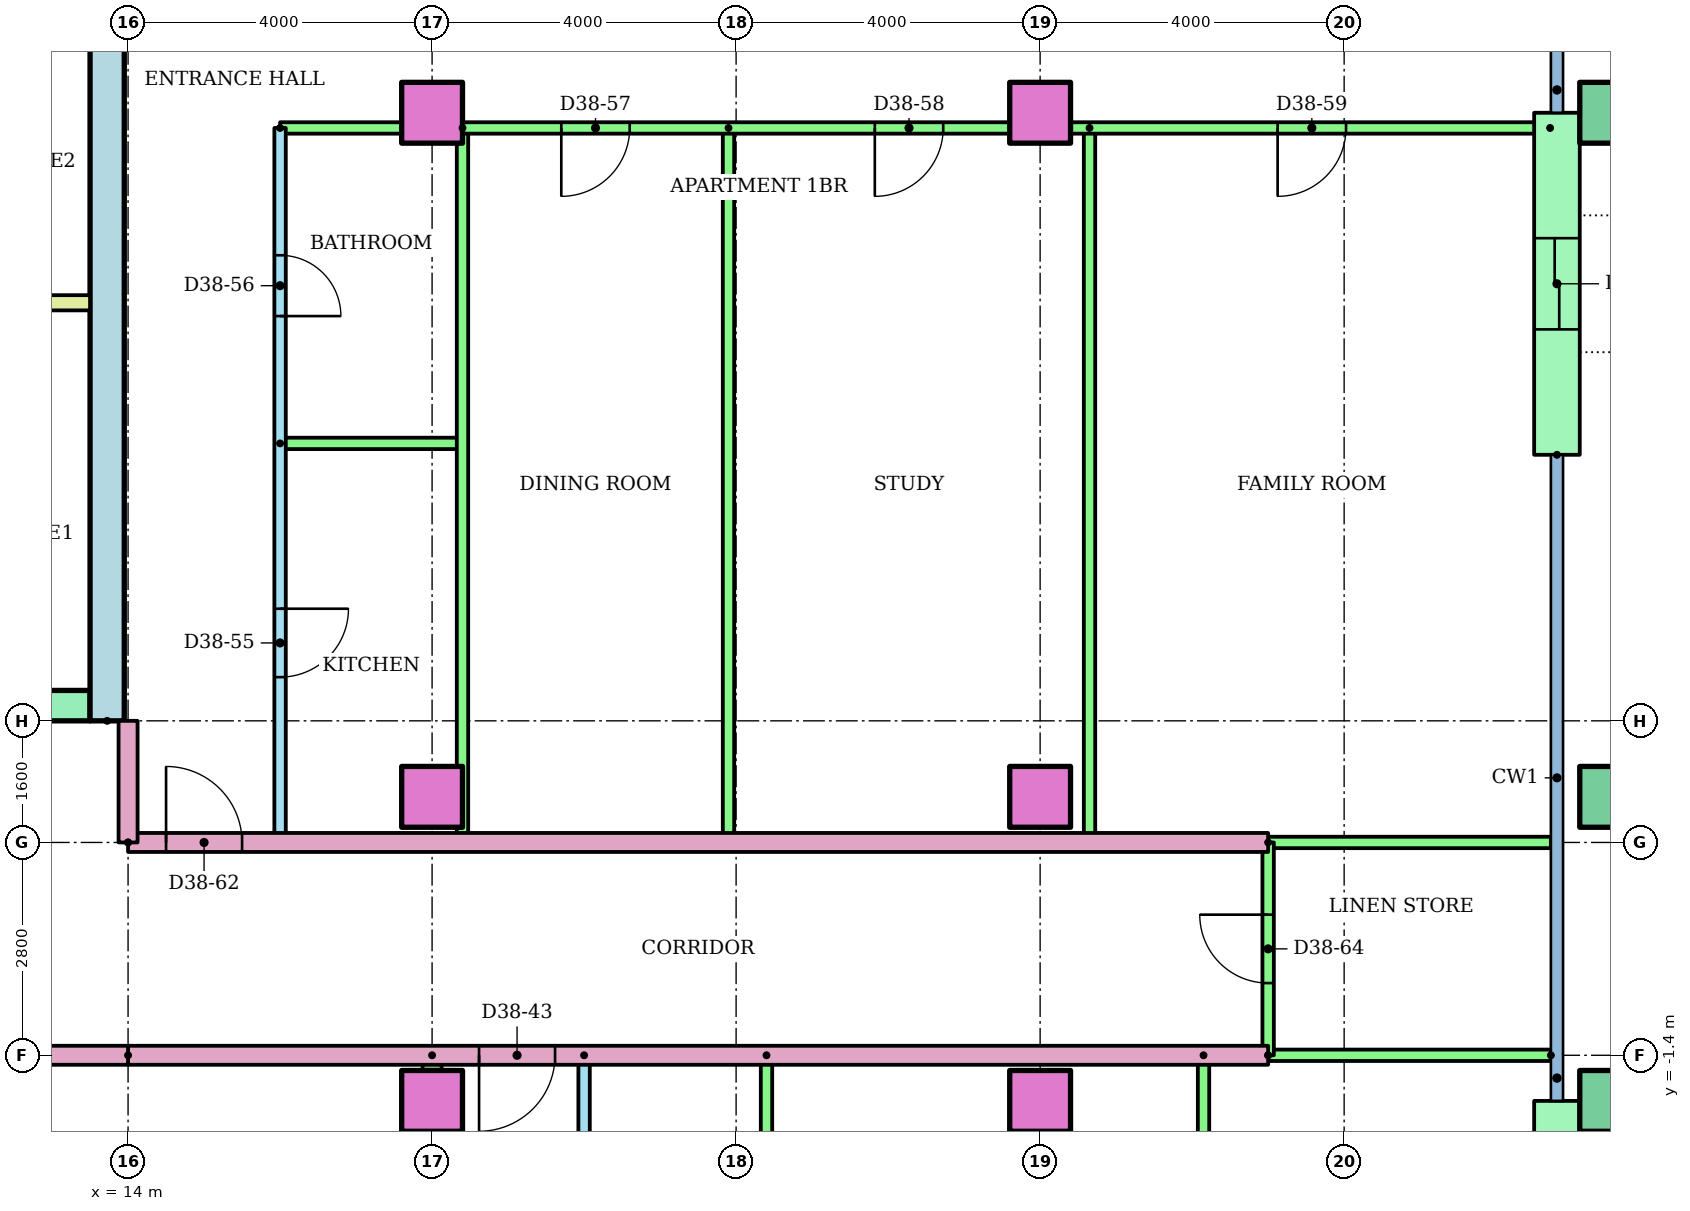
"""IFC4 building model, lengths in metres.
Left out: names, types, materials, properties, quantities, classifications, styles, units other than length and angle.
Written with IfcOpenShell. Run it as: python <this file> out.ifc"""

import sys

from ifc_helpers import new_model, si_unit, direction, frame, frame_2d, origin, origin_2d, place, context, subcontext, project, spatial, rectangle, hollow_rectangle, extrude, element, fill, save


model = new_model("IFC4")
c1 = context("Model", 3, precision=1e-05, world=origin(), true_north=direction((0.0, 1.0)))
c2 = subcontext(c1, "Body", "Model", "MODEL_VIEW")
j1 = project(units=[si_unit("LENGTHUNIT", "METRE"), si_unit("PLANEANGLEUNIT", "RADIAN")], contexts=[c1])
p1 = place(None, origin())
s1 = spatial("IfcSite", under=j1, at=p1, CompositionType="ELEMENT")
p2 = place(p1, origin())
s2 = spatial("IfcBuilding", under=s1, at=p2, CompositionType="ELEMENT")
p3 = place(p2, frame((0.0, 0.0, 145.4)))
s3 = spatial("IfcBuildingStorey", under=s2, at=p3, CompositionType="ELEMENT", Elevation=145.4)
for number, where in (
    (1, (18.0, -2.0, 0.0)),
    (2, (26.0, -2.0, 0.0)),
):
    element("IfcColumn", number, at=place(p3, frame(where)), inside=s3, PredefinedType="COLUMN", context=c2, shape_type="SweptSolid", body=[
        extrude(rectangle(XDim=0.8, YDim=0.8, at=origin_2d()), origin(), (0.0, 0.0, 1.0), 3.2),
    ])
p4 = place(p3, frame((33.5, -2.0, 0.0)))
e3 = element("IfcColumn", 3, at=p4, inside=s3, PredefinedType="COLUMN", context=c2, shape_type="SweptSolid", body=[
    extrude(hollow_rectangle(XDim=0.8, YDim=0.8, WallThickness=0.04, at=origin_2d()), origin(), (0.0, 0.0, 1.0), 3.2),
])
for number, where in (
    (4, (18.0, 2.0, 0.0)),
    (5, (26.0, 2.0, 0.0)),
):
    element("IfcColumn", number, at=place(p3, frame(where)), inside=s3, PredefinedType="COLUMN", context=c2, shape_type="SweptSolid", body=[
        extrude(rectangle(XDim=0.8, YDim=0.8, at=origin_2d()), origin(), (0.0, 0.0, 1.0), 3.2),
    ])
p5 = place(p3, frame((33.5, 2.0, 0.0)))
e6 = element("IfcColumn", 6, at=p5, inside=s3, PredefinedType="COLUMN", context=c2, shape_type="SweptSolid", body=[
    extrude(hollow_rectangle(XDim=0.8, YDim=0.8, WallThickness=0.04, at=origin_2d()), origin(), (0.0, 0.0, 1.0), 3.2),
])
for number, where in (
    (7, (18.0, 11.0, 0.0)),
    (8, (26.0, 11.0, 0.0)),
):
    element("IfcColumn", number, at=place(p3, frame(where)), inside=s3, PredefinedType="COLUMN", context=c2, shape_type="SweptSolid", body=[
        extrude(rectangle(XDim=0.8, YDim=0.8, at=origin_2d()), origin(), (0.0, 0.0, 1.0), 3.2),
    ])
p6 = place(p3, frame((33.5, 11.0, 0.0)))
e9 = element("IfcColumn", 9, at=p6, inside=s3, PredefinedType="COLUMN", context=c2, shape_type="SweptSolid", body=[
    extrude(hollow_rectangle(XDim=0.8, YDim=0.8, WallThickness=0.04, at=origin_2d()), origin(), (0.0, 0.0, 1.0), 3.2),
])
p7 = place(p3, frame((32.8, -5.7, 0.0), z_axis=(0.0, 0.0, 1.0), x_axis=(0.0, 1.0, 0.0)))
e10 = element("IfcWall", 10, at=p7, inside=s3, PredefinedType="STANDARD", context=c2, shape_type="SweptSolid", body=[
    extrude(rectangle(XDim=3.7, YDim=0.6, at=frame_2d((1.85, 0.0))), origin(), (0.0, 0.0, 1.0), 2.92),
])
p8 = place(p7, frame((1.25, 0.0, 0.0)))
e11 = element("IfcOpeningElement", 11, at=p8, cuts=e10, PredefinedType="OPENING", context=c2, shape_type="SweptSolid", body=[
    extrude(rectangle(XDim=1.2, YDim=2.1, at=frame_2d((0.6, 1.05))), frame((0.0, 0.31, 0.0), z_axis=(0.0, -1.0, 0.0), x_axis=(1.0, 0.0, 0.0)), (0.0, 0.0, 1.0), 0.62),
])
p9 = place(p3, frame((32.8, 6.5, 0.0), z_axis=(0.0, 0.0, 1.0), x_axis=(0.0, 1.0, 0.0)))
e12 = element("IfcWall", 12, at=p9, inside=s3, PredefinedType="STANDARD", context=c2, shape_type="SweptSolid", body=[
    extrude(rectangle(XDim=4.5, YDim=0.6, at=frame_2d((2.25, 0.0))), origin(), (0.0, 0.0, 1.0), 2.92),
])
p10 = place(p9, frame((1.65, 0.0, 0.0)))
e13 = element("IfcOpeningElement", 13, at=p10, cuts=e12, PredefinedType="OPENING", context=c2, shape_type="SweptSolid", body=[
    extrude(rectangle(XDim=1.2, YDim=2.1, at=frame_2d((0.6, 1.05))), frame((0.0, 0.31, 0.0), z_axis=(0.0, -1.0, 0.0), x_axis=(1.0, 0.0, 0.0)), (0.0, 0.0, 1.0), 0.62),
])
p11 = place(p3, frame((13.725, 3.0, 0.0), z_axis=(0.0, 0.0, 1.0), x_axis=(0.0, 1.0, 0.0)))
e14 = element("IfcWall", 14, at=p11, inside=s3, PredefinedType="SHEAR", context=c2, shape_type="SweptSolid", body=[
    extrude(rectangle(XDim=17.0, YDim=0.45, at=frame_2d((8.5, 0.0))), origin(), (0.0, 0.0, 1.0), 2.92),
])
p12 = place(p3, frame((-13.5, 3.2, 0.0)))
e15 = element("IfcWall", 15, at=p12, inside=s3, PredefinedType="SHEAR", context=c2, shape_type="SweptSolid", body=[
    extrude(rectangle(XDim=27.0, YDim=0.4, at=frame_2d((13.5, 0.0))), origin(), (0.0, 0.0, 1.0), 2.92),
])
p13 = place(p12, frame((6.861, 0.0, 0.0)))
e16 = element("IfcOpeningElement", 16, at=p13, cuts=e15, PredefinedType="OPENING", context=c2, shape_type="SweptSolid", body=[
    extrude(rectangle(XDim=1.1, YDim=2.1, at=frame_2d((0.55, 1.05))), frame((0.0, 0.21, 0.0), z_axis=(0.0, -1.0, 0.0), x_axis=(1.0, 0.0, 0.0)), (0.0, 0.0, 1.0), 0.42),
])
p14 = place(p12, frame((9.906, 0.0, 0.0)))
e17 = element("IfcOpeningElement", 17, at=p14, cuts=e15, PredefinedType="OPENING", context=c2, shape_type="SweptSolid", body=[
    extrude(rectangle(XDim=1.1, YDim=2.1, at=frame_2d((0.55, 1.05))), frame((0.0, 0.21, 0.0), z_axis=(0.0, -1.0, 0.0), x_axis=(1.0, 0.0, 0.0)), (0.0, 0.0, 1.0), 0.42),
])
p15 = place(p12, frame((15.994, 0.0, 0.0)))
e18 = element("IfcOpeningElement", 18, at=p15, cuts=e15, PredefinedType="OPENING", context=c2, shape_type="SweptSolid", body=[
    extrude(rectangle(XDim=1.1, YDim=2.1, at=frame_2d((0.55, 1.05))), frame((0.0, 0.21, 0.0), z_axis=(0.0, -1.0, 0.0), x_axis=(1.0, 0.0, 0.0)), (0.0, 0.0, 1.0), 0.42),
])
p16 = place(p12, frame((19.039, 0.0, 0.0)))
e19 = element("IfcOpeningElement", 19, at=p16, cuts=e15, PredefinedType="OPENING", context=c2, shape_type="SweptSolid", body=[
    extrude(rectangle(XDim=1.1, YDim=2.1, at=frame_2d((0.55, 1.05))), frame((0.0, 0.21, 0.0), z_axis=(0.0, -1.0, 0.0), x_axis=(1.0, 0.0, 0.0)), (0.0, 0.0, 1.0), 0.42),
])
p17 = place(p12, frame((12.6, 0.0, 0.0)))
e20 = element("IfcOpeningElement", 20, at=p17, cuts=e15, PredefinedType="OPENING", context=c2, shape_type="SweptSolid", body=[
    extrude(rectangle(XDim=1.8, YDim=2.1, at=frame_2d((0.9, 1.05))), frame((0.0, 0.21, 0.0), z_axis=(0.0, -1.0, 0.0), x_axis=(1.0, 0.0, 0.0)), (0.0, 0.0, 1.0), 0.42),
])
p18 = place(p3, frame((9.6, 8.5, 0.0)))
e21 = element("IfcWall", 21, at=p18, inside=s3, PredefinedType="PARTITIONING", context=c2, shape_type="SweptSolid", body=[
    extrude(rectangle(XDim=3.9, YDim=0.2, at=frame_2d((1.95, 0.0))), origin(), (0.0, 0.0, 1.0), 2.92),
])
p19 = place(p3, frame((20.0, -1.4, 0.0), z_axis=(0.0, 0.0, 1.0), x_axis=(0.0, -1.0, 0.0)))
e22 = element("IfcWall", 22, at=p19, inside=s3, PredefinedType="PARTITIONING", context=c2, shape_type="SweptSolid", body=[
    extrude(rectangle(XDim=7.0, YDim=0.15, at=frame_2d((3.5, 0.0))), origin(), (0.0, 0.0, 1.0), 2.4),
])
p20 = place(p19, frame((1.425, 0.0, 0.0)))
e23 = element("IfcOpeningElement", 23, at=p20, cuts=e22, PredefinedType="OPENING", context=c2, shape_type="SweptSolid", body=[
    extrude(rectangle(XDim=0.9, YDim=2.1, at=frame_2d((0.45, 1.05))), frame((0.0, 0.085, 0.0), z_axis=(0.0, -1.0, 0.0), x_axis=(1.0, 0.0, 0.0)), (0.0, 0.0, 1.0), 0.17),
])
p21 = place(p19, frame((4.975, 0.0, 0.0)))
e24 = element("IfcOpeningElement", 24, at=p21, cuts=e22, PredefinedType="OPENING", context=c2, shape_type="SweptSolid", body=[
    extrude(rectangle(XDim=0.8, YDim=2.1, at=frame_2d((0.4, 1.05))), frame((0.0, 0.085, 0.0), z_axis=(0.0, -1.0, 0.0), x_axis=(1.0, 0.0, 0.0)), (0.0, 0.0, 1.0), 0.17),
])
for number, where, z_axis, x_axis in (
    (25, (22.4, -1.4, 0.0), (0.0, 0.0, 1.0), (0.0, -1.0, 0.0)),
    (26, (28.15, -1.4, 0.0), (0.0, 0.0, 1.0), (0.0, -1.0, 0.0)),
):
    element("IfcWall", number, at=place(p3, frame(where, z_axis=z_axis, x_axis=x_axis)), inside=s3, PredefinedType="PARTITIONING", context=c2, shape_type="SweptSolid", body=[
        extrude(rectangle(XDim=7.0, YDim=0.15, at=frame_2d((3.5, 0.0))), origin(), (0.0, 0.0, 1.0), 2.4),
    ])
p22 = place(p3, frame((18.0, -1.4, 0.0), z_axis=(0.0, 0.0, 1.0), x_axis=(0.0, -1.0, 0.0)))
e27 = element("IfcWall", 27, at=p22, inside=s3, PredefinedType="PARTITIONING", context=c2, shape_type="SweptSolid", body=[
    extrude(rectangle(XDim=14.91, YDim=0.25, at=frame_2d((7.455, 0.0))), origin(), (0.0, 0.0, 1.0), 2.4),
])
p23 = place(p3, frame((29.0, -1.4, 0.0), z_axis=(0.0, 0.0, 1.0), x_axis=(-1.0, 0.0, 0.0)))
e28 = element("IfcWall", 28, at=p23, inside=s3, PredefinedType="PARTITIONING", context=c2, shape_type="SweptSolid", body=[
    extrude(rectangle(XDim=15.0, YDim=0.25, at=frame_2d((7.5, 0.0))), origin(), (0.0, 0.0, 1.0), 2.4),
])
p24 = place(p23, frame((9.382, 0.0, 0.0)))
e29 = element("IfcOpeningElement", 29, at=p24, cuts=e28, PredefinedType="OPENING", context=c2, shape_type="SweptSolid", body=[
    extrude(rectangle(XDim=1.0, YDim=2.1, at=frame_2d((0.5, 1.05))), frame((0.0, 0.135, 0.0), z_axis=(0.0, -1.0, 0.0), x_axis=(1.0, 0.0, 0.0)), (0.0, 0.0, 1.0), 0.27),
])
p25 = place(p3, frame((32.72, -1.4, 0.0), z_axis=(0.0, 0.0, 1.0), x_axis=(-1.0, 0.0, 0.0)))
e30 = element("IfcWall", 30, at=p25, inside=s3, PredefinedType="PARTITIONING", context=c2, shape_type="SweptSolid", body=[
    extrude(rectangle(XDim=3.72, YDim=0.15, at=frame_2d((1.86, 0.0))), origin(), (0.0, 0.0, 1.0), 2.4),
])
p26 = place(p3, frame((16.0, 10.8, 0.0), z_axis=(0.0, 0.0, 1.0), x_axis=(0.0, -1.0, 0.0)))
e31 = element("IfcWall", 31, at=p26, inside=s3, PredefinedType="PARTITIONING", context=c2, shape_type="SweptSolid", body=[
    extrude(rectangle(XDim=9.4, YDim=0.15, at=frame_2d((4.7, 0.0))), origin(), (0.0, 0.0, 1.0), 2.4),
])
p27 = place(p26, frame((6.325, 0.0, 0.0)))
e32 = element("IfcOpeningElement", 32, at=p27, cuts=e31, PredefinedType="OPENING", context=c2, shape_type="SweptSolid", body=[
    extrude(rectangle(XDim=0.9, YDim=2.1, at=frame_2d((0.45, 1.05))), frame((0.0, 0.085, 0.0), z_axis=(0.0, -1.0, 0.0), x_axis=(1.0, 0.0, 0.0)), (0.0, 0.0, 1.0), 0.17),
])
p28 = place(p26, frame((1.675, 0.0, 0.0)))
e33 = element("IfcOpeningElement", 33, at=p28, cuts=e31, PredefinedType="OPENING", context=c2, shape_type="SweptSolid", body=[
    extrude(rectangle(XDim=0.8, YDim=2.1, at=frame_2d((0.4, 1.05))), frame((0.0, 0.085, 0.0), z_axis=(0.0, -1.0, 0.0), x_axis=(1.0, 0.0, 0.0)), (0.0, 0.0, 1.0), 0.17),
])
p29 = place(p3, frame((16.0, 6.65, 0.0)))
e34 = element("IfcWall", 34, at=p29, inside=s3, PredefinedType="PARTITIONING", context=c2, shape_type="SweptSolid", body=[
    extrude(rectangle(XDim=2.4, YDim=0.15, at=frame_2d((1.2, 0.0))), origin(), (0.0, 0.0, 1.0), 2.4),
])
for number, where, z_axis, x_axis in (
    (35, (18.4, 10.8, 0.0), (0.0, 0.0, 1.0), (0.0, -1.0, 0.0)),
    (36, (21.9, 10.8, 0.0), (0.0, 0.0, 1.0), (0.0, -1.0, 0.0)),
    (37, (26.65, 10.8, 0.0), (0.0, 0.0, 1.0), (0.0, -1.0, 0.0)),
):
    element("IfcWall", number, at=place(p3, frame(where, z_axis=z_axis, x_axis=x_axis)), inside=s3, PredefinedType="PARTITIONING", context=c2, shape_type="SweptSolid", body=[
        extrude(rectangle(XDim=9.4, YDim=0.15, at=frame_2d((4.7, 0.0))), origin(), (0.0, 0.0, 1.0), 2.4),
    ])
p30 = place(p3, frame((32.71, 10.8, 0.0), z_axis=(0.0, 0.0, 1.0), x_axis=(-1.0, 0.0, 0.0)))
e38 = element("IfcWall", 38, at=p30, inside=s3, PredefinedType="PARTITIONING", context=c2, shape_type="SweptSolid", body=[
    extrude(rectangle(XDim=16.71, YDim=0.15, at=frame_2d((8.355, 0.0))), origin(), (0.0, 0.0, 1.0), 2.4),
])
p31 = place(p30, frame((12.11, 0.0, 0.0)))
e39 = element("IfcOpeningElement", 39, at=p31, cuts=e38, PredefinedType="OPENING", context=c2, shape_type="SweptSolid", body=[
    extrude(rectangle(XDim=0.9, YDim=2.1, at=frame_2d((0.45, 1.05))), frame((0.0, 0.085, 0.0), z_axis=(0.0, -1.0, 0.0), x_axis=(1.0, 0.0, 0.0)), (0.0, 0.0, 1.0), 0.17),
])
p32 = place(p30, frame((7.985, 0.0, 0.0)))
e40 = element("IfcOpeningElement", 40, at=p32, cuts=e38, PredefinedType="OPENING", context=c2, shape_type="SweptSolid", body=[
    extrude(rectangle(XDim=0.9, YDim=2.1, at=frame_2d((0.45, 1.05))), frame((0.0, 0.085, 0.0), z_axis=(0.0, -1.0, 0.0), x_axis=(1.0, 0.0, 0.0)), (0.0, 0.0, 1.0), 0.17),
])
p33 = place(p30, frame((2.685, 0.0, 0.0)))
e41 = element("IfcOpeningElement", 41, at=p33, cuts=e38, PredefinedType="OPENING", context=c2, shape_type="SweptSolid", body=[
    extrude(rectangle(XDim=0.9, YDim=2.1, at=frame_2d((0.45, 1.05))), frame((0.0, 0.085, 0.0), z_axis=(0.0, -1.0, 0.0), x_axis=(1.0, 0.0, 0.0)), (0.0, 0.0, 1.0), 0.17),
])
p34 = place(p3, frame((14.0, 1.4, 0.0)))
e42 = element("IfcWall", 42, at=p34, inside=s3, PredefinedType="PARTITIONING", context=c2, shape_type="SweptSolid", body=[
    extrude(rectangle(XDim=15.0, YDim=0.25, at=frame_2d((7.5, 0.0))), origin(), (0.0, 0.0, 1.0), 2.4),
])
p35 = place(p34, frame((0.5, 0.0, 0.0)))
e43 = element("IfcOpeningElement", 43, at=p35, cuts=e42, PredefinedType="OPENING", context=c2, shape_type="SweptSolid", body=[
    extrude(rectangle(XDim=1.0, YDim=2.1, at=frame_2d((0.5, 1.05))), frame((0.0, 0.135, 0.0), z_axis=(0.0, -1.0, 0.0), x_axis=(1.0, 0.0, 0.0)), (0.0, 0.0, 1.0), 0.27),
])
p36 = place(p3, frame((29.0, 1.4, 0.0)))
e44 = element("IfcWall", 44, at=p36, inside=s3, PredefinedType="PARTITIONING", context=c2, shape_type="SweptSolid", body=[
    extrude(rectangle(XDim=3.72, YDim=0.15, at=frame_2d((1.86, 0.0))), origin(), (0.0, 0.0, 1.0), 2.4),
])
p37 = place(p3, frame((29.0, -1.4, 0.0), z_axis=(0.0, 0.0, 1.0), x_axis=(0.0, 1.0, 0.0)))
e45 = element("IfcWall", 45, at=p37, inside=s3, PredefinedType="PARTITIONING", context=c2, shape_type="SweptSolid", body=[
    extrude(rectangle(XDim=2.8, YDim=0.15, at=frame_2d((1.4, 0.0))), origin(), (0.0, 0.0, 1.0), 2.4),
])
p38 = place(p37, frame((0.95, 0.0, 0.0)))
e46 = element("IfcOpeningElement", 46, at=p38, cuts=e45, PredefinedType="OPENING", context=c2, shape_type="SweptSolid", body=[
    extrude(rectangle(XDim=0.9, YDim=2.1, at=frame_2d((0.45, 1.05))), frame((0.0, 0.085, 0.0), z_axis=(0.0, -1.0, 0.0), x_axis=(1.0, 0.0, 0.0)), (0.0, 0.0, 1.0), 0.17),
])
p39 = place(p3, frame((14.0, -1.4, 0.0), z_axis=(0.0, 0.0, 1.0), x_axis=(-1.0, 0.0, 0.0)))
e47 = element("IfcWall", 47, at=p39, inside=s3, PredefinedType="PARTITIONING", context=c2, shape_type="SweptSolid", body=[
    extrude(rectangle(XDim=28.0, YDim=0.25, at=frame_2d((14.0, 0.0))), origin(), (0.0, 0.0, 1.0), 2.4),
])
p40 = place(p39, frame((20.618, 0.0, 0.0)))
e48 = element("IfcOpeningElement", 48, at=p40, cuts=e47, PredefinedType="OPENING", context=c2, shape_type="SweptSolid", body=[
    extrude(rectangle(XDim=1.0, YDim=2.1, at=frame_2d((0.5, 1.05))), frame((0.0, 0.135, 0.0), z_axis=(0.0, -1.0, 0.0), x_axis=(1.0, 0.0, 0.0)), (0.0, 0.0, 1.0), 0.27),
])
p41 = place(p39, frame((18.382, 0.0, 0.0)))
e49 = element("IfcOpeningElement", 49, at=p41, cuts=e47, PredefinedType="OPENING", context=c2, shape_type="SweptSolid", body=[
    extrude(rectangle(XDim=1.0, YDim=2.1, at=frame_2d((0.5, 1.05))), frame((0.0, 0.135, 0.0), z_axis=(0.0, -1.0, 0.0), x_axis=(1.0, 0.0, 0.0)), (0.0, 0.0, 1.0), 0.27),
])
p42 = place(p3, frame((14.0, 1.4, 0.0), z_axis=(0.0, 0.0, 1.0), x_axis=(0.0, 1.0, 0.0)))
e50 = element("IfcWall", 50, at=p42, inside=s3, PredefinedType="PARTITIONING", context=c2, shape_type="SweptSolid", body=[
    extrude(rectangle(XDim=1.6, YDim=0.25, at=frame_2d((0.8, 0.0))), origin(), (0.0, 0.0, 1.0), 2.4),
])
p43 = place(p24, origin())
e51 = element("IfcDoor", 51, at=p43, inside=s3, OperationType="SINGLE_SWING_RIGHT", PredefinedType="DOOR", context=c2, shape_type="SweptSolid", body=[
    extrude(rectangle(XDim=1.0, YDim=2.1, at=frame_2d((0.5, 1.05))), frame((0.0, 0.025, 0.0), z_axis=(0.0, -1.0, 0.0), x_axis=(1.0, 0.0, 0.0)), (0.0, 0.0, 1.0), 0.05),
])
fill(e29, e51)
p44 = place(p27, origin())
e52 = element("IfcDoor", 52, at=p44, inside=s3, OperationType="SINGLE_SWING_LEFT", PredefinedType="DOOR", context=c2, shape_type="SweptSolid", body=[
    extrude(rectangle(XDim=0.9, YDim=2.1, at=frame_2d((0.45, 1.05))), frame((0.0, 0.025, 0.0), z_axis=(0.0, -1.0, 0.0), x_axis=(1.0, 0.0, 0.0)), (0.0, 0.0, 1.0), 0.05),
])
fill(e32, e52)
p45 = place(p28, origin())
e53 = element("IfcDoor", 53, at=p45, inside=s3, OperationType="SINGLE_SWING_RIGHT", PredefinedType="DOOR", context=c2, shape_type="SweptSolid", body=[
    extrude(rectangle(XDim=0.8, YDim=2.1, at=frame_2d((0.4, 1.05))), frame((0.0, 0.025, 0.0), z_axis=(0.0, -1.0, 0.0), x_axis=(1.0, 0.0, 0.0)), (0.0, 0.0, 1.0), 0.05),
])
fill(e33, e53)
p46 = place(p31, origin())
e54 = element("IfcDoor", 54, at=p46, inside=s3, OperationType="SINGLE_SWING_RIGHT", PredefinedType="DOOR", context=c2, shape_type="SweptSolid", body=[
    extrude(rectangle(XDim=0.9, YDim=2.1, at=frame_2d((0.45, 1.05))), frame((0.0, 0.025, 0.0), z_axis=(0.0, -1.0, 0.0), x_axis=(1.0, 0.0, 0.0)), (0.0, 0.0, 1.0), 0.05),
])
fill(e39, e54)
p47 = place(p32, origin())
e55 = element("IfcDoor", 55, at=p47, inside=s3, OperationType="SINGLE_SWING_RIGHT", PredefinedType="DOOR", context=c2, shape_type="SweptSolid", body=[
    extrude(rectangle(XDim=0.9, YDim=2.1, at=frame_2d((0.45, 1.05))), frame((0.0, 0.025, 0.0), z_axis=(0.0, -1.0, 0.0), x_axis=(1.0, 0.0, 0.0)), (0.0, 0.0, 1.0), 0.05),
])
fill(e40, e55)
p48 = place(p33, origin())
e56 = element("IfcDoor", 56, at=p48, inside=s3, OperationType="SINGLE_SWING_RIGHT", PredefinedType="DOOR", context=c2, shape_type="SweptSolid", body=[
    extrude(rectangle(XDim=0.9, YDim=2.1, at=frame_2d((0.45, 1.05))), frame((0.0, 0.025, 0.0), z_axis=(0.0, -1.0, 0.0), x_axis=(1.0, 0.0, 0.0)), (0.0, 0.0, 1.0), 0.05),
])
fill(e41, e56)
p49 = place(p35, origin())
e57 = element("IfcDoor", 57, at=p49, inside=s3, OperationType="SINGLE_SWING_LEFT", PredefinedType="DOOR", context=c2, shape_type="SweptSolid", body=[
    extrude(rectangle(XDim=1.0, YDim=2.1, at=frame_2d((0.5, 1.05))), frame((0.0, 0.025, 0.0), z_axis=(0.0, -1.0, 0.0), x_axis=(1.0, 0.0, 0.0)), (0.0, 0.0, 1.0), 0.05),
])
fill(e43, e57)
p50 = place(p38, origin())
e58 = element("IfcDoor", 58, at=p50, inside=s3, OperationType="SINGLE_SWING_RIGHT", PredefinedType="DOOR", context=c2, shape_type="SweptSolid", body=[
    extrude(rectangle(XDim=0.9, YDim=2.1, at=frame_2d((0.45, 1.05))), frame((0.0, 0.025, 0.0), z_axis=(0.0, -1.0, 0.0), x_axis=(1.0, 0.0, 0.0)), (0.0, 0.0, 1.0), 0.05),
])
fill(e46, e58)
p51 = place(p10, origin())
e59 = element("IfcDoor", 59, at=p51, inside=s3, OperationType="SLIDING_TO_LEFT", PredefinedType="DOOR", context=c2, shape_type="SweptSolid", body=[
    extrude(rectangle(XDim=1.2, YDim=2.1, at=frame_2d((0.6, 1.05))), frame((0.0, 0.025, 0.0), z_axis=(0.0, -1.0, 0.0), x_axis=(1.0, 0.0, 0.0)), (0.0, 0.0, 1.0), 0.05),
])
fill(e13, e59)
save(model, sys.argv[1])
